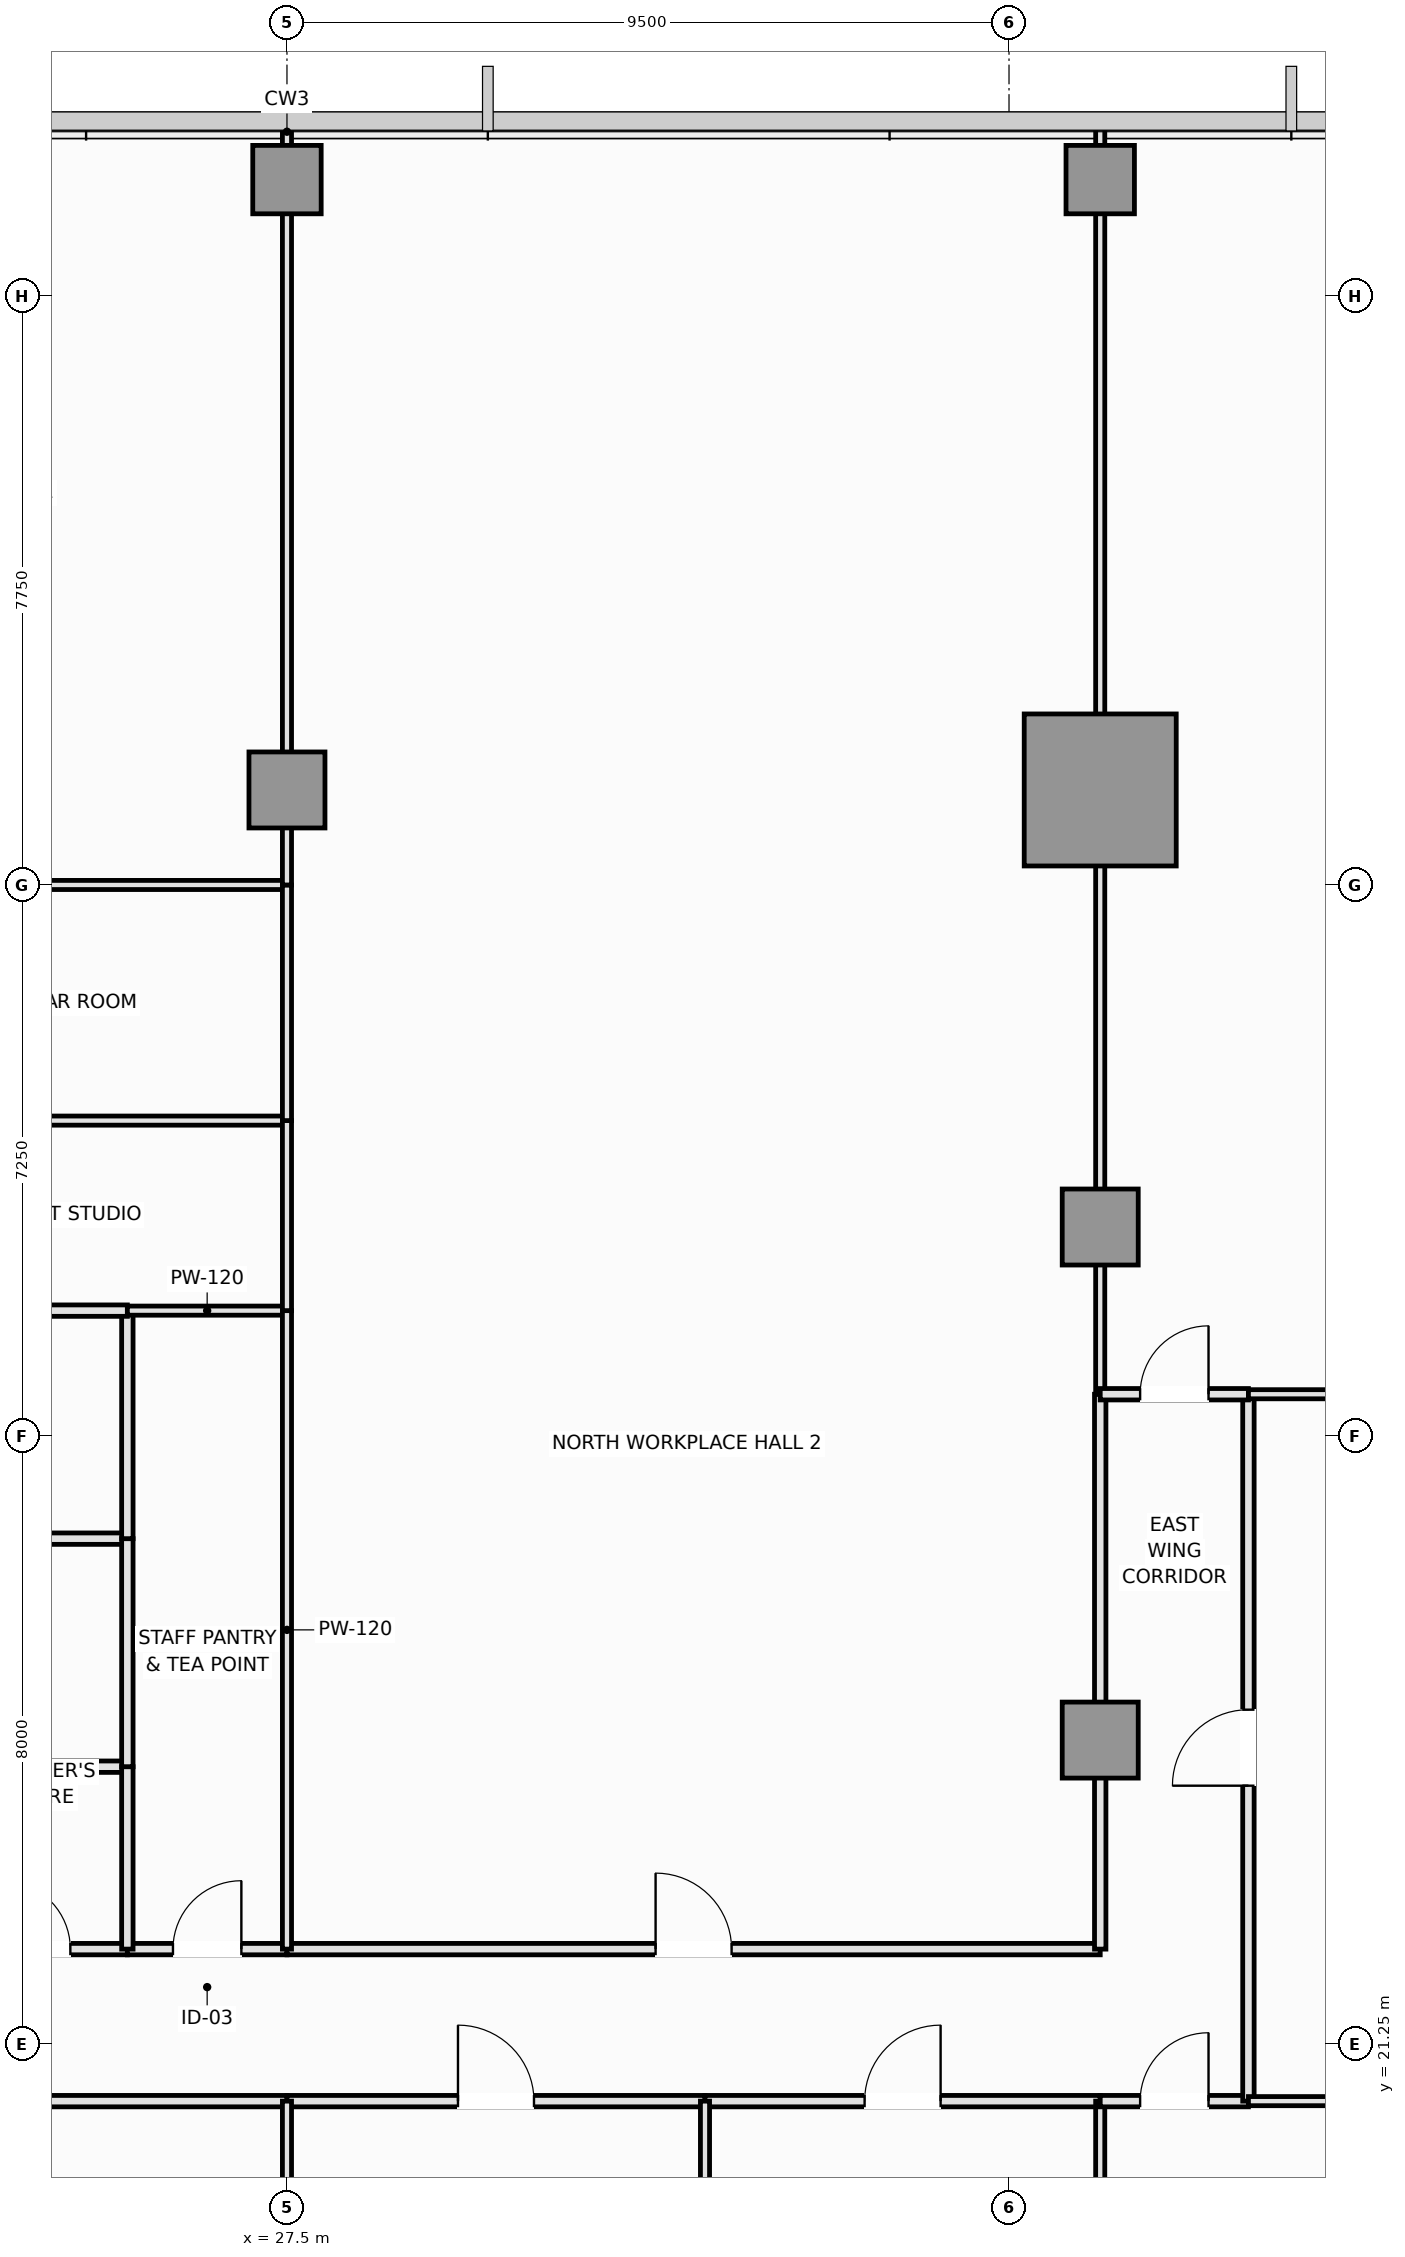
"""IFC4 building model, lengths in metres.
Left out: names, types, materials, properties, quantities, classifications, styles, units other than length and angle.
Written with IfcOpenShell. Run it as: python <this file> out.ifc"""

import sys

from ifc_helpers import new_model, si_unit, direction, frame, frame_2d, origin, origin_2d, place, context, subcontext, project, spatial, rectangle, extrude, element, fill, save


model = new_model("IFC4")
c1 = context("Model", 3, precision=1e-05, world=origin(), true_north=direction((0.0, 1.0)))
c2 = subcontext(c1, "Body", "Model", "MODEL_VIEW")
j1 = project(units=[si_unit("LENGTHUNIT", "METRE"), si_unit("PLANEANGLEUNIT", "RADIAN")], contexts=[c1])
p1 = place(None, origin())
s1 = spatial("IfcSite", under=j1, at=p1, CompositionType="ELEMENT")
p2 = place(p1, origin())
s2 = spatial("IfcBuilding", under=s1, at=p2, CompositionType="ELEMENT")
p3 = place(p2, frame((0.0, 0.0, 105.8)))
s3 = spatial("IfcBuildingStorey", under=s2, at=p3, CompositionType="ELEMENT", Elevation=105.8)
p4 = place(p3, frame((38.2, 37.75, 0.0), z_axis=(0.0, 0.0, 1.0), x_axis=(1.0, 0.0, 0.0)))
e1 = element("IfcColumn", 1, at=p4, inside=s3, PredefinedType="COLUMN", context=c2, shape_type="SweptSolid", body=[
    extrude(rectangle(XDim=2.0, YDim=2.0, at=origin_2d()), origin(), (0.0, 0.0, 1.0), 3.55),
])
for number, where, z_axis, x_axis in (
    (2, (27.5, 37.75, 0.0), (0.0, 0.0, 1.0), (1.0, 0.0, 0.0)),
    (3, (38.2, 25.25, 0.0), (0.0, 0.0, 1.0), (1.0, 0.0, 0.0)),
    (4, (38.2, 32.0, 0.0), (0.0, 0.0, 1.0), (1.0, 0.0, 0.0)),
):
    element("IfcColumn", number, at=place(p3, frame(where, z_axis=z_axis, x_axis=x_axis)), inside=s3, PredefinedType="COLUMN", context=c2, shape_type="SweptSolid", body=[
        extrude(rectangle(XDim=1.0, YDim=1.0, at=origin_2d()), origin(), (0.0, 0.0, 1.0), 3.55),
    ])
for number, where, z_axis, x_axis in (
    (5, (27.5, 45.78, 0.0), (0.0, 0.0, 1.0), (1.0, 0.0, 0.0)),
    (6, (38.2, 45.78, 0.0), (0.0, 0.0, 1.0), (1.0, 0.0, 0.0)),
):
    element("IfcColumn", number, at=place(p3, frame(where, z_axis=z_axis, x_axis=x_axis)), inside=s3, PredefinedType="COLUMN", context=c2, shape_type="SweptSolid", body=[
        extrude(rectangle(XDim=0.9, YDim=0.9, at=origin_2d()), origin(), (0.0, 0.0, 1.0), 3.55),
    ])
p5 = place(p3, frame((23.0, 22.5, 0.0), z_axis=(0.0, 0.0, 1.0), x_axis=(1.0, 0.0, 0.0)))
e7 = element("IfcWall", 7, at=p5, inside=s3, PredefinedType="PLUMBINGWALL", context=c2, shape_type="SweptSolid", body=[
    extrude(rectangle(XDim=2.4, YDim=0.15, at=frame_2d((1.2, 0.0))), origin(), (0.0, 0.0, 1.0), 3.37),
])
p6 = place(p5, frame((0.75, 0.0, 0.0)))
e8 = element("IfcOpeningElement", 8, at=p6, cuts=e7, PredefinedType="OPENING", context=c2, shape_type="SweptSolid", body=[
    extrude(rectangle(XDim=0.9, YDim=2.1, at=frame_2d((0.45, 1.05))), frame((0.0, 0.085, 0.0), z_axis=(0.0, -1.0, 0.0), x_axis=(1.0, 0.0, 0.0)), (0.0, 0.0, 1.0), 0.17),
])
p7 = place(p3, frame((25.4, 22.5, 0.0), z_axis=(0.0, 0.0, 1.0), x_axis=(1.0, 0.0, 0.0)))
e9 = element("IfcWall", 9, at=p7, inside=s3, PredefinedType="PARTITIONING", context=c2, shape_type="SweptSolid", body=[
    extrude(rectangle(XDim=2.1, YDim=0.15, at=frame_2d((1.05, 0.0))), origin(), (0.0, 0.0, 1.0), 3.37),
])
p8 = place(p7, frame((0.6, 0.0, 0.0)))
e10 = element("IfcOpeningElement", 10, at=p8, cuts=e9, PredefinedType="OPENING", context=c2, shape_type="SweptSolid", body=[
    extrude(rectangle(XDim=0.9, YDim=2.1, at=frame_2d((0.45, 1.05))), frame((0.0, 0.085, 0.0), z_axis=(0.0, -1.0, 0.0), x_axis=(1.0, 0.0, 0.0)), (0.0, 0.0, 1.0), 0.17),
])
p9 = place(p3, frame((19.95, 20.5, 0.0), z_axis=(0.0, 0.0, 1.0), x_axis=(1.0, 0.0, 0.0)))
e11 = element("IfcWall", 11, at=p9, inside=s3, PredefinedType="PARTITIONING", context=c2, shape_type="SweptSolid", body=[
    extrude(rectangle(XDim=7.55, YDim=0.15, at=frame_2d((3.775, 0.0))), origin(), (0.0, 0.0, 1.0), 3.37),
])
p10 = place(p3, frame((27.5, 20.5, 0.0), z_axis=(0.0, 0.0, 1.0), x_axis=(1.0, 0.0, 0.0)))
e12 = element("IfcWall", 12, at=p10, inside=s3, PredefinedType="PARTITIONING", context=c2, shape_type="SweptSolid", body=[
    extrude(rectangle(XDim=5.5, YDim=0.15, at=frame_2d((2.75, 0.0))), origin(), (0.0, 0.0, 1.0), 3.37),
])
p11 = place(p10, frame((2.25, 0.0, 0.0)))
e13 = element("IfcOpeningElement", 13, at=p11, cuts=e12, PredefinedType="OPENING", context=c2, shape_type="SweptSolid", body=[
    extrude(rectangle(XDim=1.0, YDim=2.15, at=frame_2d((0.5, 1.075))), frame((0.0, 0.085, 0.0), z_axis=(0.0, -1.0, 0.0), x_axis=(1.0, 0.0, 0.0)), (0.0, 0.0, 1.0), 0.17),
])
p12 = place(p3, frame((33.0, 20.5, 0.0), z_axis=(0.0, 0.0, 1.0), x_axis=(1.0, 0.0, 0.0)))
e14 = element("IfcWall", 14, at=p12, inside=s3, PredefinedType="PARTITIONING", context=c2, shape_type="SweptSolid", body=[
    extrude(rectangle(XDim=5.2, YDim=0.15, at=frame_2d((2.6, 0.0))), origin(), (0.0, 0.0, 1.0), 3.37),
])
p13 = place(p12, frame((2.1, 0.0, 0.0)))
e15 = element("IfcOpeningElement", 15, at=p13, cuts=e14, PredefinedType="OPENING", context=c2, shape_type="SweptSolid", body=[
    extrude(rectangle(XDim=1.0, YDim=2.15, at=frame_2d((0.5, 1.075))), frame((0.0, 0.085, 0.0), z_axis=(0.0, -1.0, 0.0), x_axis=(1.0, 0.0, 0.0)), (0.0, 0.0, 1.0), 0.17),
])
p14 = place(p3, frame((27.5, 22.5, 0.0), z_axis=(0.0, 0.0, 1.0), x_axis=(1.0, 0.0, 0.0)))
e16 = element("IfcWall", 16, at=p14, inside=s3, PredefinedType="PARTITIONING", context=c2, shape_type="SweptSolid", body=[
    extrude(rectangle(XDim=10.7, YDim=0.15, at=frame_2d((5.35, 0.0))), origin(), (0.0, 0.0, 1.0), 3.37),
])
p15 = place(p14, frame((4.85, 0.0, 0.0)))
e17 = element("IfcOpeningElement", 17, at=p15, cuts=e16, PredefinedType="OPENING", context=c2, shape_type="SweptSolid", body=[
    extrude(rectangle(XDim=1.0, YDim=2.15, at=frame_2d((0.5, 1.075))), frame((0.0, 0.085, 0.0), z_axis=(0.0, -1.0, 0.0), x_axis=(1.0, 0.0, 0.0)), (0.0, 0.0, 1.0), 0.17),
])
for number, where, z_axis, x_axis in (
    (18, (23.0, 24.9, 0.0), (0.0, 0.0, 1.0), (1.0, 0.0, 0.0)),
    (19, (25.4, 22.5, 0.0), (0.0, 0.0, 1.0), (0.0, 1.0, 0.0)),
):
    element("IfcWall", number, at=place(p3, frame(where, z_axis=z_axis, x_axis=x_axis)), inside=s3, PredefinedType="PLUMBINGWALL", context=c2, shape_type="SweptSolid", body=[
        extrude(rectangle(XDim=2.4, YDim=0.15, at=frame_2d((1.2, 0.0))), origin(), (0.0, 0.0, 1.0), 3.37),
    ])
p16 = place(p3, frame((19.95, 27.9, 0.0), z_axis=(0.0, 0.0, 1.0), x_axis=(1.0, 0.0, 0.0)))
e20 = element("IfcWall", 20, at=p16, inside=s3, PredefinedType="PLUMBINGWALL", context=c2, shape_type="SweptSolid", body=[
    extrude(rectangle(XDim=5.45, YDim=0.15, at=frame_2d((2.725, 0.0))), origin(), (0.0, 0.0, 1.0), 3.37),
])
for number, where, z_axis, x_axis in (
    (21, (25.4, 24.9, 0.0), (0.0, 0.0, 1.0), (0.0, 1.0, 0.0)),
    (22, (25.4, 27.9, 0.0), (0.0, 0.0, 1.0), (0.0, 1.0, 0.0)),
):
    element("IfcWall", number, at=place(p3, frame(where, z_axis=z_axis, x_axis=x_axis)), inside=s3, PredefinedType="PLUMBINGWALL", context=c2, shape_type="SweptSolid", body=[
        extrude(rectangle(XDim=3.0, YDim=0.15, at=frame_2d((1.5, 0.0))), origin(), (0.0, 0.0, 1.0), 3.37),
    ])
p17 = place(p3, frame((19.95, 30.9, 0.0), z_axis=(0.0, 0.0, 1.0), x_axis=(1.0, 0.0, 0.0)))
e23 = element("IfcWall", 23, at=p17, inside=s3, PredefinedType="PLUMBINGWALL", context=c2, shape_type="SweptSolid", body=[
    extrude(rectangle(XDim=5.45, YDim=0.15, at=frame_2d((2.725, 0.0))), origin(), (0.0, 0.0, 1.0), 3.37),
])
p18 = place(p3, frame((25.4, 30.9, 0.0), z_axis=(0.0, 0.0, 1.0), x_axis=(1.0, 0.0, 0.0)))
e24 = element("IfcWall", 24, at=p18, inside=s3, PredefinedType="PARTITIONING", context=c2, shape_type="SweptSolid", body=[
    extrude(rectangle(XDim=2.1, YDim=0.12, at=frame_2d((1.05, 0.0))), origin(), (0.0, 0.0, 1.0), 3.37),
])
p19 = place(p3, frame((27.5, 22.5, 0.0), z_axis=(0.0, 0.0, 1.0), x_axis=(0.0, 1.0, 0.0)))
e25 = element("IfcWall", 25, at=p19, inside=s3, PredefinedType="PARTITIONING", context=c2, shape_type="SweptSolid", body=[
    extrude(rectangle(XDim=8.4, YDim=0.12, at=frame_2d((4.2, 0.0))), origin(), (0.0, 0.0, 1.0), 3.37),
])
p20 = place(p3, frame((19.95, 33.4, 0.0), z_axis=(0.0, 0.0, 1.0), x_axis=(1.0, 0.0, 0.0)))
e26 = element("IfcWall", 26, at=p20, inside=s3, PredefinedType="PARTITIONING", context=c2, shape_type="SweptSolid", body=[
    extrude(rectangle(XDim=7.55, YDim=0.12, at=frame_2d((3.775, 0.0))), origin(), (0.0, 0.0, 1.0), 3.37),
])
p21 = place(p3, frame((27.5, 30.9, 0.0), z_axis=(0.0, 0.0, 1.0), x_axis=(0.0, 1.0, 0.0)))
e27 = element("IfcWall", 27, at=p21, inside=s3, PredefinedType="PARTITIONING", context=c2, shape_type="SweptSolid", body=[
    extrude(rectangle(XDim=2.5, YDim=0.12, at=frame_2d((1.25, 0.0))), origin(), (0.0, 0.0, 1.0), 3.37),
])
p22 = place(p3, frame((19.95, 36.5, 0.0), z_axis=(0.0, 0.0, 1.0), x_axis=(1.0, 0.0, 0.0)))
e28 = element("IfcWall", 28, at=p22, inside=s3, PredefinedType="PARTITIONING", context=c2, shape_type="SweptSolid", body=[
    extrude(rectangle(XDim=7.55, YDim=0.12, at=frame_2d((3.775, 0.0))), origin(), (0.0, 0.0, 1.0), 3.37),
])
p23 = place(p3, frame((27.5, 33.4, 0.0), z_axis=(0.0, 0.0, 1.0), x_axis=(0.0, 1.0, 0.0)))
e29 = element("IfcWall", 29, at=p23, inside=s3, PredefinedType="PARTITIONING", context=c2, shape_type="SweptSolid", body=[
    extrude(rectangle(XDim=3.1, YDim=0.12, at=frame_2d((1.55, 0.0))), origin(), (0.0, 0.0, 1.0), 3.37),
])
p24 = place(p3, frame((27.5, 3.51, 0.0), z_axis=(0.0, 0.0, 1.0), x_axis=(0.0, 1.0, 0.0)))
e30 = element("IfcWall", 30, at=p24, inside=s3, PredefinedType="PARTITIONING", context=c2, shape_type="SweptSolid", body=[
    extrude(rectangle(XDim=16.99, YDim=0.12, at=frame_2d((8.495, 0.0))), origin(), (0.0, 0.0, 1.0), 2.87),
])
p25 = place(p3, frame((33.0, 3.51, 0.0), z_axis=(0.0, 0.0, 1.0), x_axis=(0.0, 1.0, 0.0)))
e31 = element("IfcWall", 31, at=p25, inside=s3, PredefinedType="PARTITIONING", context=c2, shape_type="SweptSolid", body=[
    extrude(rectangle(XDim=16.99, YDim=0.12, at=frame_2d((8.495, 0.0))), origin(), (0.0, 0.0, 1.0), 3.37),
])
p26 = place(p3, frame((38.2, 3.51, 0.0), z_axis=(0.0, 0.0, 1.0), x_axis=(0.0, 1.0, 0.0)))
e32 = element("IfcWall", 32, at=p26, inside=s3, PredefinedType="PARTITIONING", context=c2, shape_type="SweptSolid", body=[
    extrude(rectangle(XDim=16.99, YDim=0.12, at=frame_2d((8.495, 0.0))), origin(), (0.0, 0.0, 1.0), 2.87),
])
p27 = place(p3, frame((27.5, 36.5, 0.0), z_axis=(0.0, 0.0, 1.0), x_axis=(0.0, 1.0, 0.0)))
e33 = element("IfcWall", 33, at=p27, inside=s3, PredefinedType="PARTITIONING", context=c2, shape_type="SweptSolid", body=[
    extrude(rectangle(XDim=9.99, YDim=0.12, at=frame_2d((4.995, 0.0))), origin(), (0.0, 0.0, 1.0), 2.87),
])
p28 = place(p3, frame((38.2, 22.5, 0.0), z_axis=(0.0, 0.0, 1.0), x_axis=(0.0, 1.0, 0.0)))
e34 = element("IfcWall", 34, at=p28, inside=s3, PredefinedType="PARTITIONING", context=c2, shape_type="SweptSolid", body=[
    extrude(rectangle(XDim=7.3, YDim=0.15, at=frame_2d((3.65, 0.0))), origin(), (0.0, 0.0, 1.0), 2.87),
])
p29 = place(p3, frame((38.2, 29.8, 0.0), z_axis=(0.0, 0.0, 1.0), x_axis=(0.0, 1.0, 0.0)))
e35 = element("IfcWall", 35, at=p29, inside=s3, PredefinedType="PARTITIONING", context=c2, shape_type="SweptSolid", body=[
    extrude(rectangle(XDim=16.69, YDim=0.12, at=frame_2d((8.345, 0.0))), origin(), (0.0, 0.0, 1.0), 2.87),
])
p30 = place(p3, frame((38.2, 20.5, 0.0), z_axis=(0.0, 0.0, 1.0), x_axis=(1.0, 0.0, 0.0)))
e36 = element("IfcWall", 36, at=p30, inside=s3, PredefinedType="PARTITIONING", context=c2, shape_type="SweptSolid", body=[
    extrude(rectangle(XDim=1.95, YDim=0.15, at=frame_2d((0.975, 0.0))), origin(), (0.0, 0.0, 1.0), 3.37),
])
p31 = place(p30, frame((0.525, 0.0, 0.0)))
e37 = element("IfcOpeningElement", 37, at=p31, cuts=e36, PredefinedType="OPENING", context=c2, shape_type="SweptSolid", body=[
    extrude(rectangle(XDim=0.9, YDim=2.1, at=frame_2d((0.45, 1.05))), frame((0.0, 0.085, 0.0), z_axis=(0.0, -1.0, 0.0), x_axis=(1.0, 0.0, 0.0)), (0.0, 0.0, 1.0), 0.17),
])
p32 = place(p3, frame((40.15, 20.5, 0.0), z_axis=(0.0, 0.0, 1.0), x_axis=(0.0, 1.0, 0.0)))
e38 = element("IfcWall", 38, at=p32, inside=s3, PredefinedType="PARTITIONING", context=c2, shape_type="SweptSolid", body=[
    extrude(rectangle(XDim=9.3, YDim=0.15, at=frame_2d((4.65, 0.0))), origin(), (0.0, 0.0, 1.0), 3.37),
])
p33 = place(p32, frame((4.15, 0.0, 0.0)))
e39 = element("IfcOpeningElement", 39, at=p33, cuts=e38, PredefinedType="OPENING", context=c2, shape_type="SweptSolid", body=[
    extrude(rectangle(XDim=1.0, YDim=2.15, at=frame_2d((0.5, 1.075))), frame((0.0, 0.085, 0.0), z_axis=(0.0, -1.0, 0.0), x_axis=(1.0, 0.0, 0.0)), (0.0, 0.0, 1.0), 0.17),
])
p34 = place(p3, frame((38.2, 29.8, 0.0), z_axis=(0.0, 0.0, 1.0), x_axis=(1.0, 0.0, 0.0)))
e40 = element("IfcWall", 40, at=p34, inside=s3, PredefinedType="PARTITIONING", context=c2, shape_type="SweptSolid", body=[
    extrude(rectangle(XDim=1.95, YDim=0.15, at=frame_2d((0.975, 0.0))), origin(), (0.0, 0.0, 1.0), 3.37),
])
p35 = place(p34, frame((0.525, 0.0, 0.0)))
e41 = element("IfcOpeningElement", 41, at=p35, cuts=e40, PredefinedType="OPENING", context=c2, shape_type="SweptSolid", body=[
    extrude(rectangle(XDim=0.9, YDim=2.1, at=frame_2d((0.45, 1.05))), frame((0.0, 0.085, 0.0), z_axis=(0.0, -1.0, 0.0), x_axis=(1.0, 0.0, 0.0)), (0.0, 0.0, 1.0), 0.17),
])
for number, where, z_axis, x_axis in (
    (42, (40.15, 20.5, 0.0), (0.0, 0.0, 1.0), (1.0, 0.0, 0.0)),
    (43, (40.15, 29.8, 0.0), (0.0, 0.0, 1.0), (1.0, 0.0, 0.0)),
):
    element("IfcWall", number, at=place(p3, frame(where, z_axis=z_axis, x_axis=x_axis)), inside=s3, PredefinedType="PARTITIONING", context=c2, shape_type="SweptSolid", body=[
        extrude(rectangle(XDim=10.34, YDim=0.12, at=frame_2d((5.17, 0.0))), origin(), (0.0, 0.0, 1.0), 3.37),
    ])
p36 = place(p6, origin())
e44 = element("IfcDoor", 44, at=p36, inside=s3, OperationType="SINGLE_SWING_LEFT", PredefinedType="DOOR", context=c2, shape_type="SweptSolid", body=[
    extrude(rectangle(XDim=0.9, YDim=2.1, at=frame_2d((0.45, 1.05))), frame((0.0, 0.025, 0.0), z_axis=(0.0, -1.0, 0.0), x_axis=(1.0, 0.0, 0.0)), (0.0, 0.0, 1.0), 0.05),
])
fill(e8, e44)
p37 = place(p8, origin())
e45 = element("IfcDoor", 45, at=p37, inside=s3, OperationType="SINGLE_SWING_RIGHT", PredefinedType="DOOR", context=c2, shape_type="SweptSolid", body=[
    extrude(rectangle(XDim=0.9, YDim=2.1, at=frame_2d((0.45, 1.05))), frame((0.0, 0.025, 0.0), z_axis=(0.0, -1.0, 0.0), x_axis=(1.0, 0.0, 0.0)), (0.0, 0.0, 1.0), 0.05),
])
fill(e10, e45)
p38 = place(p11, origin())
e46 = element("IfcDoor", 46, at=p38, inside=s3, OperationType="SINGLE_SWING_LEFT", PredefinedType="DOOR", context=c2, shape_type="SweptSolid", body=[
    extrude(rectangle(XDim=1.0, YDim=2.15, at=frame_2d((0.5, 1.075))), frame((0.0, 0.025, 0.0), z_axis=(0.0, -1.0, 0.0), x_axis=(1.0, 0.0, 0.0)), (0.0, 0.0, 1.0), 0.05),
])
fill(e13, e46)
p39 = place(p13, origin())
e47 = element("IfcDoor", 47, at=p39, inside=s3, OperationType="SINGLE_SWING_RIGHT", PredefinedType="DOOR", context=c2, shape_type="SweptSolid", body=[
    extrude(rectangle(XDim=1.0, YDim=2.15, at=frame_2d((0.5, 1.075))), frame((0.0, 0.025, 0.0), z_axis=(0.0, -1.0, 0.0), x_axis=(1.0, 0.0, 0.0)), (0.0, 0.0, 1.0), 0.05),
])
fill(e15, e47)
p40 = place(p15, origin())
e48 = element("IfcDoor", 48, at=p40, inside=s3, OperationType="SINGLE_SWING_LEFT", PredefinedType="DOOR", context=c2, shape_type="SweptSolid", body=[
    extrude(rectangle(XDim=1.0, YDim=2.15, at=frame_2d((0.5, 1.075))), frame((0.0, 0.025, 0.0), z_axis=(0.0, -1.0, 0.0), x_axis=(1.0, 0.0, 0.0)), (0.0, 0.0, 1.0), 0.05),
])
fill(e17, e48)
p41 = place(p31, origin())
e49 = element("IfcDoor", 49, at=p41, inside=s3, OperationType="SINGLE_SWING_RIGHT", PredefinedType="DOOR", context=c2, shape_type="SweptSolid", body=[
    extrude(rectangle(XDim=0.9, YDim=2.1, at=frame_2d((0.45, 1.05))), frame((0.0, 0.025, 0.0), z_axis=(0.0, -1.0, 0.0), x_axis=(1.0, 0.0, 0.0)), (0.0, 0.0, 1.0), 0.05),
])
fill(e37, e49)
p42 = place(p33, origin())
e50 = element("IfcDoor", 50, at=p42, inside=s3, OperationType="SINGLE_SWING_LEFT", PredefinedType="DOOR", context=c2, shape_type="SweptSolid", body=[
    extrude(rectangle(XDim=1.0, YDim=2.15, at=frame_2d((0.5, 1.075))), frame((0.0, 0.025, 0.0), z_axis=(0.0, -1.0, 0.0), x_axis=(1.0, 0.0, 0.0)), (0.0, 0.0, 1.0), 0.05),
])
fill(e39, e50)
p43 = place(p35, origin())
e51 = element("IfcDoor", 51, at=p43, inside=s3, OperationType="SINGLE_SWING_RIGHT", PredefinedType="DOOR", context=c2, shape_type="SweptSolid", body=[
    extrude(rectangle(XDim=0.9, YDim=2.1, at=frame_2d((0.45, 1.05))), frame((0.0, 0.025, 0.0), z_axis=(0.0, -1.0, 0.0), x_axis=(1.0, 0.0, 0.0)), (0.0, 0.0, 1.0), 0.05),
])
fill(e41, e51)
save(model, sys.argv[1])
